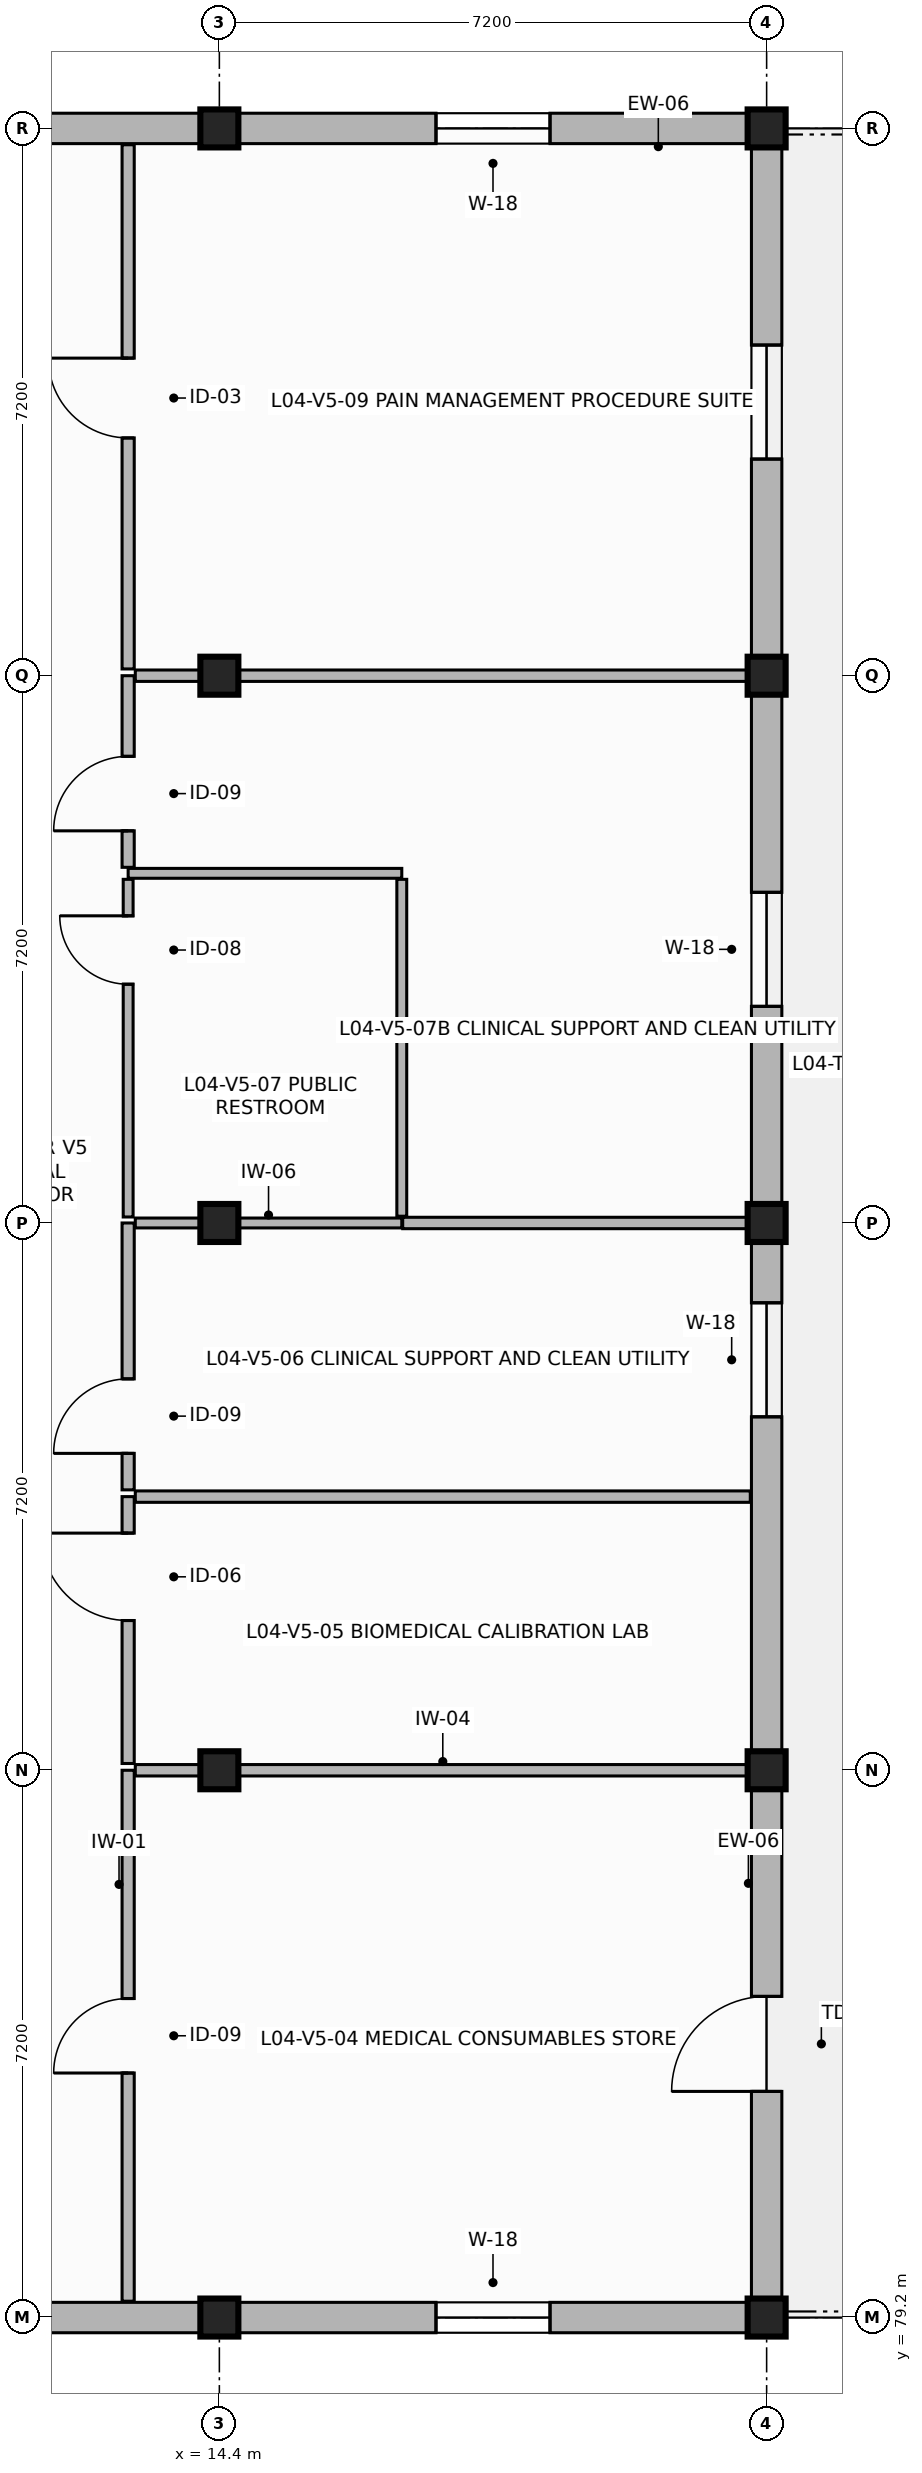
"""IFC4 building model, lengths in metres.
Left out: names, types, materials, properties, quantities, classifications, styles, units other than length and angle.
Written with IfcOpenShell. Run it as: python <this file> out.ifc"""

import sys

from ifc_helpers import new_model, si_unit, direction, frame, frame_2d, origin, origin_2d, place, context, subcontext, project, spatial, rectangle, extrude, element, fill, save


model = new_model("IFC4")
c1 = context("Model", 3, precision=1e-05, world=origin(), true_north=direction((0.0, 1.0)))
c2 = subcontext(c1, "Body", "Model", "MODEL_VIEW")
j1 = project(units=[si_unit("LENGTHUNIT", "METRE"), si_unit("PLANEANGLEUNIT", "RADIAN")], contexts=[c1])
p1 = place(None, origin())
s1 = spatial("IfcSite", under=j1, at=p1, CompositionType="ELEMENT")
p2 = place(p1, origin())
s2 = spatial("IfcBuilding", under=s1, at=p2, CompositionType="ELEMENT")
p3 = place(p2, frame((0.0, 0.0, 16.0)))
s3 = spatial("IfcBuildingStorey", under=s2, at=p3, CompositionType="ELEMENT", Elevation=16.0)
for number, where, z_axis, x_axis in (
    (1, (14.4, 79.2, 0.0), (0.0, 0.0, 1.0), (1.0, 0.0, 0.0)),
    (2, (14.4, 86.4, 0.0), (0.0, 0.0, 1.0), (1.0, 0.0, 0.0)),
    (3, (14.4, 93.6, 0.0), (0.0, 0.0, 1.0), (1.0, 0.0, 0.0)),
    (4, (14.4, 100.8, 0.0), (0.0, 0.0, 1.0), (1.0, 0.0, 0.0)),
    (5, (14.4, 108.0, 0.0), (0.0, 0.0, 1.0), (1.0, 0.0, 0.0)),
    (6, (21.6, 79.2, 0.0), (0.0, 0.0, 1.0), (1.0, 0.0, 0.0)),
    (7, (21.6, 86.4, 0.0), (0.0, 0.0, 1.0), (1.0, 0.0, 0.0)),
    (8, (21.6, 93.6, 0.0), (0.0, 0.0, 1.0), (1.0, 0.0, 0.0)),
    (9, (21.6, 100.8, 0.0), (0.0, 0.0, 1.0), (1.0, 0.0, 0.0)),
    (10, (21.6, 108.0, 0.0), (0.0, 0.0, 1.0), (1.0, 0.0, 0.0)),
):
    element("IfcColumn", number, at=place(p3, frame(where, z_axis=z_axis, x_axis=x_axis)), inside=s3, PredefinedType="COLUMN", context=c2, shape_type="SweptSolid", body=[
        extrude(rectangle(XDim=0.5, YDim=0.5, at=origin_2d()), origin(), (0.0, 0.0, 1.0), 3.46),
    ])
p4 = place(p3, frame((7.2, 79.2, 0.0), z_axis=(0.0, 0.0, 1.0), x_axis=(1.0, 0.0, 0.0)))
e11 = element("IfcWall", 11, at=p4, inside=s3, PredefinedType="SOLIDWALL", context=c2, shape_type="SweptSolid", body=[
    extrude(rectangle(XDim=7.2, YDim=0.4, at=frame_2d((3.6, 0.0))), origin(), (0.0, 0.0, 1.0), 2.79),
])
p5 = place(p4, frame((0.85, 0.0, 0.9)))
e12 = element("IfcOpeningElement", 12, at=p5, cuts=e11, PredefinedType="OPENING", context=c2, shape_type="SweptSolid", body=[
    extrude(rectangle(XDim=1.5, YDim=1.6, at=frame_2d((0.75, 0.8))), frame((0.0, 0.21, 0.0), z_axis=(0.0, -1.0, 0.0), x_axis=(1.0, 0.0, 0.0)), (0.0, 0.0, 1.0), 0.42),
])
p6 = place(p3, frame((14.4, 79.2, 0.0), z_axis=(0.0, 0.0, 1.0), x_axis=(1.0, 0.0, 0.0)))
e13 = element("IfcWall", 13, at=p6, inside=s3, PredefinedType="SOLIDWALL", context=c2, shape_type="SweptSolid", body=[
    extrude(rectangle(XDim=7.2, YDim=0.4, at=frame_2d((3.6, 0.0))), origin(), (0.0, 0.0, 1.0), 2.79),
])
p7 = place(p6, frame((2.85, 0.0, 0.9)))
e14 = element("IfcOpeningElement", 14, at=p7, cuts=e13, PredefinedType="OPENING", context=c2, shape_type="SweptSolid", body=[
    extrude(rectangle(XDim=1.5, YDim=1.6, at=frame_2d((0.75, 0.8))), frame((0.0, 0.21, 0.0), z_axis=(0.0, -1.0, 0.0), x_axis=(1.0, 0.0, 0.0)), (0.0, 0.0, 1.0), 0.42),
])
p8 = place(p3, frame((21.6, 79.2, 0.0), z_axis=(0.0, 0.0, 1.0), x_axis=(0.0, 1.0, 0.0)))
e15 = element("IfcWall", 15, at=p8, inside=s3, PredefinedType="SOLIDWALL", context=c2, shape_type="SweptSolid", body=[
    extrude(rectangle(XDim=7.2, YDim=0.4, at=frame_2d((3.6, 0.0))), origin(), (0.0, 0.0, 1.0), 2.79),
])
p9 = place(p8, frame((2.975, 0.0, 0.0)))
e16 = element("IfcOpeningElement", 16, at=p9, cuts=e15, PredefinedType="OPENING", context=c2, shape_type="SweptSolid", body=[
    extrude(rectangle(XDim=1.25, YDim=2.25, at=frame_2d((0.625, 1.125))), frame((0.0, 0.21, 0.0), z_axis=(0.0, -1.0, 0.0), x_axis=(1.0, 0.0, 0.0)), (0.0, 0.0, 1.0), 0.42),
])
p10 = place(p3, frame((21.6, 86.4, 0.0), z_axis=(0.0, 0.0, 1.0), x_axis=(0.0, 1.0, 0.0)))
e17 = element("IfcWall", 17, at=p10, inside=s3, PredefinedType="SOLIDWALL", context=c2, shape_type="SweptSolid", body=[
    extrude(rectangle(XDim=7.2, YDim=0.4, at=frame_2d((3.6, 0.0))), origin(), (0.0, 0.0, 1.0), 2.79),
])
p11 = place(p10, frame((4.65, 0.0, 0.9)))
e18 = element("IfcOpeningElement", 18, at=p11, cuts=e17, PredefinedType="OPENING", context=c2, shape_type="SweptSolid", body=[
    extrude(rectangle(XDim=1.5, YDim=1.6, at=frame_2d((0.75, 0.8))), frame((0.0, 0.21, 0.0), z_axis=(0.0, -1.0, 0.0), x_axis=(1.0, 0.0, 0.0)), (0.0, 0.0, 1.0), 0.42),
])
p12 = place(p3, frame((21.6, 93.6, 0.0), z_axis=(0.0, 0.0, 1.0), x_axis=(0.0, 1.0, 0.0)))
e19 = element("IfcWall", 19, at=p12, inside=s3, PredefinedType="SOLIDWALL", context=c2, shape_type="SweptSolid", body=[
    extrude(rectangle(XDim=7.2, YDim=0.4, at=frame_2d((3.6, 0.0))), origin(), (0.0, 0.0, 1.0), 2.79),
])
p13 = place(p12, frame((2.85, 0.0, 0.9)))
e20 = element("IfcOpeningElement", 20, at=p13, cuts=e19, PredefinedType="OPENING", context=c2, shape_type="SweptSolid", body=[
    extrude(rectangle(XDim=1.5, YDim=1.6, at=frame_2d((0.75, 0.8))), frame((0.0, 0.21, 0.0), z_axis=(0.0, -1.0, 0.0), x_axis=(1.0, 0.0, 0.0)), (0.0, 0.0, 1.0), 0.42),
])
p14 = place(p3, frame((21.6, 100.8, 0.0), z_axis=(0.0, 0.0, 1.0), x_axis=(0.0, 1.0, 0.0)))
e21 = element("IfcWall", 21, at=p14, inside=s3, PredefinedType="SOLIDWALL", context=c2, shape_type="SweptSolid", body=[
    extrude(rectangle(XDim=7.2, YDim=0.4, at=frame_2d((3.6, 0.0))), origin(), (0.0, 0.0, 1.0), 2.79),
])
p15 = place(p14, frame((2.85, 0.0, 0.9)))
e22 = element("IfcOpeningElement", 22, at=p15, cuts=e21, PredefinedType="OPENING", context=c2, shape_type="SweptSolid", body=[
    extrude(rectangle(XDim=1.5, YDim=1.6, at=frame_2d((0.75, 0.8))), frame((0.0, 0.21, 0.0), z_axis=(0.0, -1.0, 0.0), x_axis=(1.0, 0.0, 0.0)), (0.0, 0.0, 1.0), 0.42),
])
p16 = place(p3, frame((21.6, 108.0, 0.0), z_axis=(0.0, 0.0, 1.0), x_axis=(-1.0, 0.0, 0.0)))
e23 = element("IfcWall", 23, at=p16, inside=s3, PredefinedType="SOLIDWALL", context=c2, shape_type="SweptSolid", body=[
    extrude(rectangle(XDim=7.2, YDim=0.4, at=frame_2d((3.6, 0.0))), origin(), (0.0, 0.0, 1.0), 2.79),
])
p17 = place(p16, frame((2.85, 0.0, 0.9)))
e24 = element("IfcOpeningElement", 24, at=p17, cuts=e23, PredefinedType="OPENING", context=c2, shape_type="SweptSolid", body=[
    extrude(rectangle(XDim=1.5, YDim=1.6, at=frame_2d((0.75, 0.8))), frame((0.0, 0.21, 0.0), z_axis=(0.0, -1.0, 0.0), x_axis=(1.0, 0.0, 0.0)), (0.0, 0.0, 1.0), 0.42),
])
p18 = place(p3, frame((14.4, 108.0, 0.0), z_axis=(0.0, 0.0, 1.0), x_axis=(-1.0, 0.0, 0.0)))
e25 = element("IfcWall", 25, at=p18, inside=s3, PredefinedType="SOLIDWALL", context=c2, shape_type="SweptSolid", body=[
    extrude(rectangle(XDim=7.2, YDim=0.4, at=frame_2d((3.6, 0.0))), origin(), (0.0, 0.0, 1.0), 2.79),
])
p19 = place(p18, frame((4.85, 0.0, 0.9)))
e26 = element("IfcOpeningElement", 26, at=p19, cuts=e25, PredefinedType="OPENING", context=c2, shape_type="SweptSolid", body=[
    extrude(rectangle(XDim=1.5, YDim=1.6, at=frame_2d((0.75, 0.8))), frame((0.0, 0.21, 0.0), z_axis=(0.0, -1.0, 0.0), x_axis=(1.0, 0.0, 0.0)), (0.0, 0.0, 1.0), 0.42),
])
p20 = place(p3, frame((13.2, 79.415, 0.0), z_axis=(0.0, 0.0, 1.0), x_axis=(0.0, 1.0, 0.0)))
e27 = element("IfcWall", 27, at=p20, inside=s3, PredefinedType="PARTITIONING", context=c2, shape_type="SweptSolid", body=[
    extrude(rectangle(XDim=6.985, YDim=0.16, at=frame_2d((3.492, 0.0))), origin(), (0.0, 0.0, 1.0), 2.78),
])
p21 = place(p20, frame((3.002, 0.0, 0.0)))
e28 = element("IfcOpeningElement", 28, at=p21, cuts=e27, PredefinedType="OPENING", context=c2, shape_type="SweptSolid", body=[
    extrude(rectangle(XDim=0.98, YDim=2.15, at=frame_2d((0.49, 1.075))), frame((0.0, 0.09, 0.0), z_axis=(0.0, -1.0, 0.0), x_axis=(1.0, 0.0, 0.0)), (0.0, 0.0, 1.0), 0.18),
])
p22 = place(p3, frame((13.294, 86.4, 0.0), z_axis=(0.0, 0.0, 1.0), x_axis=(1.0, 0.0, 0.0)))
e29 = element("IfcWall", 29, at=p22, inside=s3, PredefinedType="PARTITIONING", context=c2, shape_type="SweptSolid", body=[
    extrude(rectangle(XDim=8.091, YDim=0.15, at=frame_2d((4.045, 0.0))), origin(), (0.0, 0.0, 1.0), 2.78),
])
p23 = place(p3, frame((13.2, 86.489, 0.0), z_axis=(0.0, 0.0, 1.0), x_axis=(0.0, 1.0, 0.0)))
e30 = element("IfcWall", 30, at=p23, inside=s3, PredefinedType="PARTITIONING", context=c2, shape_type="SweptSolid", body=[
    extrude(rectangle(XDim=3.511, YDim=0.16, at=frame_2d((1.755, 0.0))), origin(), (0.0, 0.0, 1.0), 2.78),
])
p24 = place(p23, frame((1.881, 0.0, 0.0)))
e31 = element("IfcOpeningElement", 31, at=p24, cuts=e30, PredefinedType="OPENING", context=c2, shape_type="SweptSolid", body=[
    extrude(rectangle(XDim=1.15, YDim=2.25, at=frame_2d((0.575, 1.125))), frame((0.0, 0.09, 0.0), z_axis=(0.0, -1.0, 0.0), x_axis=(1.0, 0.0, 0.0)), (0.0, 0.0, 1.0), 0.18),
])
p25 = place(p3, frame((13.294, 90.0, 0.0), z_axis=(0.0, 0.0, 1.0), x_axis=(1.0, 0.0, 0.0)))
e32 = element("IfcWall", 32, at=p25, inside=s3, PredefinedType="PARTITIONING", context=c2, shape_type="SweptSolid", body=[
    extrude(rectangle(XDim=8.091, YDim=0.15, at=frame_2d((4.045, 0.0))), origin(), (0.0, 0.0, 1.0), 2.78),
])
p26 = place(p3, frame((13.2, 90.089, 0.0), z_axis=(0.0, 0.0, 1.0), x_axis=(0.0, 1.0, 0.0)))
e33 = element("IfcWall", 33, at=p26, inside=s3, PredefinedType="PARTITIONING", context=c2, shape_type="SweptSolid", body=[
    extrude(rectangle(XDim=3.511, YDim=0.16, at=frame_2d((1.755, 0.0))), origin(), (0.0, 0.0, 1.0), 2.78),
])
p27 = place(p26, frame((0.48, 0.0, 0.0)))
e34 = element("IfcOpeningElement", 34, at=p27, cuts=e33, PredefinedType="OPENING", context=c2, shape_type="SweptSolid", body=[
    extrude(rectangle(XDim=0.98, YDim=2.15, at=frame_2d((0.49, 1.075))), frame((0.0, 0.09, 0.0), z_axis=(0.0, -1.0, 0.0), x_axis=(1.0, 0.0, 0.0)), (0.0, 0.0, 1.0), 0.18),
])
p28 = place(p3, frame((13.294, 93.6, 0.0), z_axis=(0.0, 0.0, 1.0), x_axis=(1.0, 0.0, 0.0)))
e35 = element("IfcWall", 35, at=p28, inside=s3, PredefinedType="PARTITIONING", context=c2, shape_type="SweptSolid", body=[
    extrude(rectangle(XDim=3.506, YDim=0.13, at=frame_2d((1.753, 0.0))), origin(), (0.0, 0.0, 1.0), 2.78),
])
p29 = place(p3, frame((16.812, 93.6, 0.0), z_axis=(0.0, 0.0, 1.0), x_axis=(1.0, 0.0, 0.0)))
e36 = element("IfcWall", 36, at=p29, inside=s3, PredefinedType="PARTITIONING", context=c2, shape_type="SweptSolid", body=[
    extrude(rectangle(XDim=4.573, YDim=0.15, at=frame_2d((2.287, 0.0))), origin(), (0.0, 0.0, 1.0), 2.78),
])
p30 = place(p3, frame((13.2, 98.2, 0.0), z_axis=(0.0, 0.0, 1.0), x_axis=(1.0, 0.0, 0.0)))
e37 = element("IfcWall", 37, at=p30, inside=s3, PredefinedType="PARTITIONING", context=c2, shape_type="SweptSolid", body=[
    extrude(rectangle(XDim=3.6, YDim=0.13, at=frame_2d((1.8, 0.0))), origin(), (0.0, 0.0, 1.0), 2.78),
])
p31 = place(p3, frame((16.8, 98.121, 0.0), z_axis=(0.0, 0.0, 1.0), x_axis=(0.0, -1.0, 0.0)))
e38 = element("IfcWall", 38, at=p31, inside=s3, PredefinedType="PARTITIONING", context=c2, shape_type="SweptSolid", body=[
    extrude(rectangle(XDim=4.432, YDim=0.13, at=frame_2d((2.216, 0.0))), origin(), (0.0, 0.0, 1.0), 2.78),
])
p32 = place(p3, frame((13.2, 93.679, 0.0), z_axis=(0.0, 0.0, 1.0), x_axis=(0.0, 1.0, 0.0)))
e39 = element("IfcWall", 39, at=p32, inside=s3, PredefinedType="PARTITIONING", context=c2, shape_type="SweptSolid", body=[
    extrude(rectangle(XDim=4.442, YDim=0.13, at=frame_2d((2.221, 0.0))), origin(), (0.0, 0.0, 1.0), 2.78),
])
p33 = place(p32, frame((3.062, 0.0, 0.0)))
e40 = element("IfcOpeningElement", 40, at=p33, cuts=e39, PredefinedType="OPENING", context=c2, shape_type="SweptSolid", body=[
    extrude(rectangle(XDim=0.9, YDim=2.1, at=frame_2d((0.45, 1.05))), frame((0.0, 0.075, 0.0), z_axis=(0.0, -1.0, 0.0), x_axis=(1.0, 0.0, 0.0)), (0.0, 0.0, 1.0), 0.15),
])
p34 = place(p3, frame((13.2, 98.279, 0.0), z_axis=(0.0, 0.0, 1.0), x_axis=(0.0, 1.0, 0.0)))
e41 = element("IfcWall", 41, at=p34, inside=s3, PredefinedType="PARTITIONING", context=c2, shape_type="SweptSolid", body=[
    extrude(rectangle(XDim=2.521, YDim=0.16, at=frame_2d((1.26, 0.0))), origin(), (0.0, 0.0, 1.0), 2.78),
])
p35 = place(p34, frame((0.48, 0.0, 0.0)))
e42 = element("IfcOpeningElement", 42, at=p35, cuts=e41, PredefinedType="OPENING", context=c2, shape_type="SweptSolid", body=[
    extrude(rectangle(XDim=0.98, YDim=2.15, at=frame_2d((0.49, 1.075))), frame((0.0, 0.09, 0.0), z_axis=(0.0, -1.0, 0.0), x_axis=(1.0, 0.0, 0.0)), (0.0, 0.0, 1.0), 0.18),
])
p36 = place(p3, frame((13.294, 100.8, 0.0), z_axis=(0.0, 0.0, 1.0), x_axis=(1.0, 0.0, 0.0)))
e43 = element("IfcWall", 43, at=p36, inside=s3, PredefinedType="PARTITIONING", context=c2, shape_type="SweptSolid", body=[
    extrude(rectangle(XDim=8.091, YDim=0.15, at=frame_2d((4.045, 0.0))), origin(), (0.0, 0.0, 1.0), 2.78),
])
p37 = place(p3, frame((13.2, 100.889, 0.0), z_axis=(0.0, 0.0, 1.0), x_axis=(0.0, 1.0, 0.0)))
e44 = element("IfcWall", 44, at=p37, inside=s3, PredefinedType="PARTITIONING", context=c2, shape_type="SweptSolid", body=[
    extrude(rectangle(XDim=6.896, YDim=0.16, at=frame_2d((3.448, 0.0))), origin(), (0.0, 0.0, 1.0), 2.78),
])
p38 = place(p37, frame((3.039, 0.0, 0.0)))
e45 = element("IfcOpeningElement", 45, at=p38, cuts=e44, PredefinedType="OPENING", context=c2, shape_type="SweptSolid", body=[
    extrude(rectangle(XDim=1.05, YDim=2.15, at=frame_2d((0.525, 1.075))), frame((0.0, 0.09, 0.0), z_axis=(0.0, -1.0, 0.0), x_axis=(1.0, 0.0, 0.0)), (0.0, 0.0, 1.0), 0.18),
])
p39 = place(p7, origin())
e46 = element("IfcWindow", 46, at=p39, inside=s3, PartitioningType="SINGLE_PANEL", PredefinedType="WINDOW", context=c2, shape_type="SweptSolid", body=[
    extrude(rectangle(XDim=1.5, YDim=1.6, at=frame_2d((0.75, 0.8))), frame((0.0, 0.03, 0.0), z_axis=(0.0, -1.0, 0.0), x_axis=(1.0, 0.0, 0.0)), (0.0, 0.0, 1.0), 0.06),
])
fill(e14, e46)
p40 = place(p9, origin())
e47 = element("IfcDoor", 47, at=p40, inside=s3, OperationType="SINGLE_SWING_LEFT", PredefinedType="DOOR", context=c2, shape_type="SweptSolid", body=[
    extrude(rectangle(XDim=1.25, YDim=2.25, at=frame_2d((0.625, 1.125))), frame((0.0, 0.025, 0.0), z_axis=(0.0, -1.0, 0.0), x_axis=(1.0, 0.0, 0.0)), (0.0, 0.0, 1.0), 0.05),
])
fill(e16, e47)
p41 = place(p11, origin())
e48 = element("IfcWindow", 48, at=p41, inside=s3, PartitioningType="SINGLE_PANEL", PredefinedType="WINDOW", context=c2, shape_type="SweptSolid", body=[
    extrude(rectangle(XDim=1.5, YDim=1.6, at=frame_2d((0.75, 0.8))), frame((0.0, 0.03, 0.0), z_axis=(0.0, -1.0, 0.0), x_axis=(1.0, 0.0, 0.0)), (0.0, 0.0, 1.0), 0.06),
])
fill(e18, e48)
p42 = place(p13, origin())
e49 = element("IfcWindow", 49, at=p42, inside=s3, PartitioningType="SINGLE_PANEL", PredefinedType="WINDOW", context=c2, shape_type="SweptSolid", body=[
    extrude(rectangle(XDim=1.5, YDim=1.6, at=frame_2d((0.75, 0.8))), frame((0.0, 0.03, 0.0), z_axis=(0.0, -1.0, 0.0), x_axis=(1.0, 0.0, 0.0)), (0.0, 0.0, 1.0), 0.06),
])
fill(e20, e49)
p43 = place(p15, origin())
e50 = element("IfcWindow", 50, at=p43, inside=s3, PartitioningType="SINGLE_PANEL", PredefinedType="WINDOW", context=c2, shape_type="SweptSolid", body=[
    extrude(rectangle(XDim=1.5, YDim=1.6, at=frame_2d((0.75, 0.8))), frame((0.0, 0.03, 0.0), z_axis=(0.0, -1.0, 0.0), x_axis=(1.0, 0.0, 0.0)), (0.0, 0.0, 1.0), 0.06),
])
fill(e22, e50)
p44 = place(p17, origin())
e51 = element("IfcWindow", 51, at=p44, inside=s3, PartitioningType="SINGLE_PANEL", PredefinedType="WINDOW", context=c2, shape_type="SweptSolid", body=[
    extrude(rectangle(XDim=1.5, YDim=1.6, at=frame_2d((0.75, 0.8))), frame((0.0, 0.03, 0.0), z_axis=(0.0, -1.0, 0.0), x_axis=(1.0, 0.0, 0.0)), (0.0, 0.0, 1.0), 0.06),
])
fill(e24, e51)
p45 = place(p21, origin())
e52 = element("IfcDoor", 52, at=p45, inside=s3, OperationType="SINGLE_SWING_LEFT", PredefinedType="DOOR", context=c2, shape_type="SweptSolid", body=[
    extrude(rectangle(XDim=0.98, YDim=2.15, at=frame_2d((0.49, 1.075))), frame((0.0, 0.025, 0.0), z_axis=(0.0, -1.0, 0.0), x_axis=(1.0, 0.0, 0.0)), (0.0, 0.0, 1.0), 0.05),
])
fill(e28, e52)
p46 = place(p24, origin())
e53 = element("IfcDoor", 53, at=p46, inside=s3, OperationType="SINGLE_SWING_RIGHT", PredefinedType="DOOR", context=c2, shape_type="SweptSolid", body=[
    extrude(rectangle(XDim=1.15, YDim=2.25, at=frame_2d((0.575, 1.125))), frame((0.0, 0.025, 0.0), z_axis=(0.0, -1.0, 0.0), x_axis=(1.0, 0.0, 0.0)), (0.0, 0.0, 1.0), 0.05),
])
fill(e31, e53)
p47 = place(p27, origin())
e54 = element("IfcDoor", 54, at=p47, inside=s3, OperationType="SINGLE_SWING_LEFT", PredefinedType="DOOR", context=c2, shape_type="SweptSolid", body=[
    extrude(rectangle(XDim=0.98, YDim=2.15, at=frame_2d((0.49, 1.075))), frame((0.0, 0.025, 0.0), z_axis=(0.0, -1.0, 0.0), x_axis=(1.0, 0.0, 0.0)), (0.0, 0.0, 1.0), 0.05),
])
fill(e34, e54)
p48 = place(p33, origin())
e55 = element("IfcDoor", 55, at=p48, inside=s3, OperationType="SINGLE_SWING_RIGHT", PredefinedType="DOOR", context=c2, shape_type="SweptSolid", body=[
    extrude(rectangle(XDim=0.9, YDim=2.1, at=frame_2d((0.45, 1.05))), frame((0.0, 0.025, 0.0), z_axis=(0.0, -1.0, 0.0), x_axis=(1.0, 0.0, 0.0)), (0.0, 0.0, 1.0), 0.05),
])
fill(e40, e55)
p49 = place(p35, origin())
e56 = element("IfcDoor", 56, at=p49, inside=s3, OperationType="SINGLE_SWING_LEFT", PredefinedType="DOOR", context=c2, shape_type="SweptSolid", body=[
    extrude(rectangle(XDim=0.98, YDim=2.15, at=frame_2d((0.49, 1.075))), frame((0.0, 0.025, 0.0), z_axis=(0.0, -1.0, 0.0), x_axis=(1.0, 0.0, 0.0)), (0.0, 0.0, 1.0), 0.05),
])
fill(e42, e56)
p50 = place(p38, origin())
e57 = element("IfcDoor", 57, at=p50, inside=s3, OperationType="SINGLE_SWING_RIGHT", PredefinedType="DOOR", context=c2, shape_type="SweptSolid", body=[
    extrude(rectangle(XDim=1.05, YDim=2.15, at=frame_2d((0.525, 1.075))), frame((0.0, 0.025, 0.0), z_axis=(0.0, -1.0, 0.0), x_axis=(1.0, 0.0, 0.0)), (0.0, 0.0, 1.0), 0.05),
])
fill(e45, e57)
save(model, sys.argv[1])
